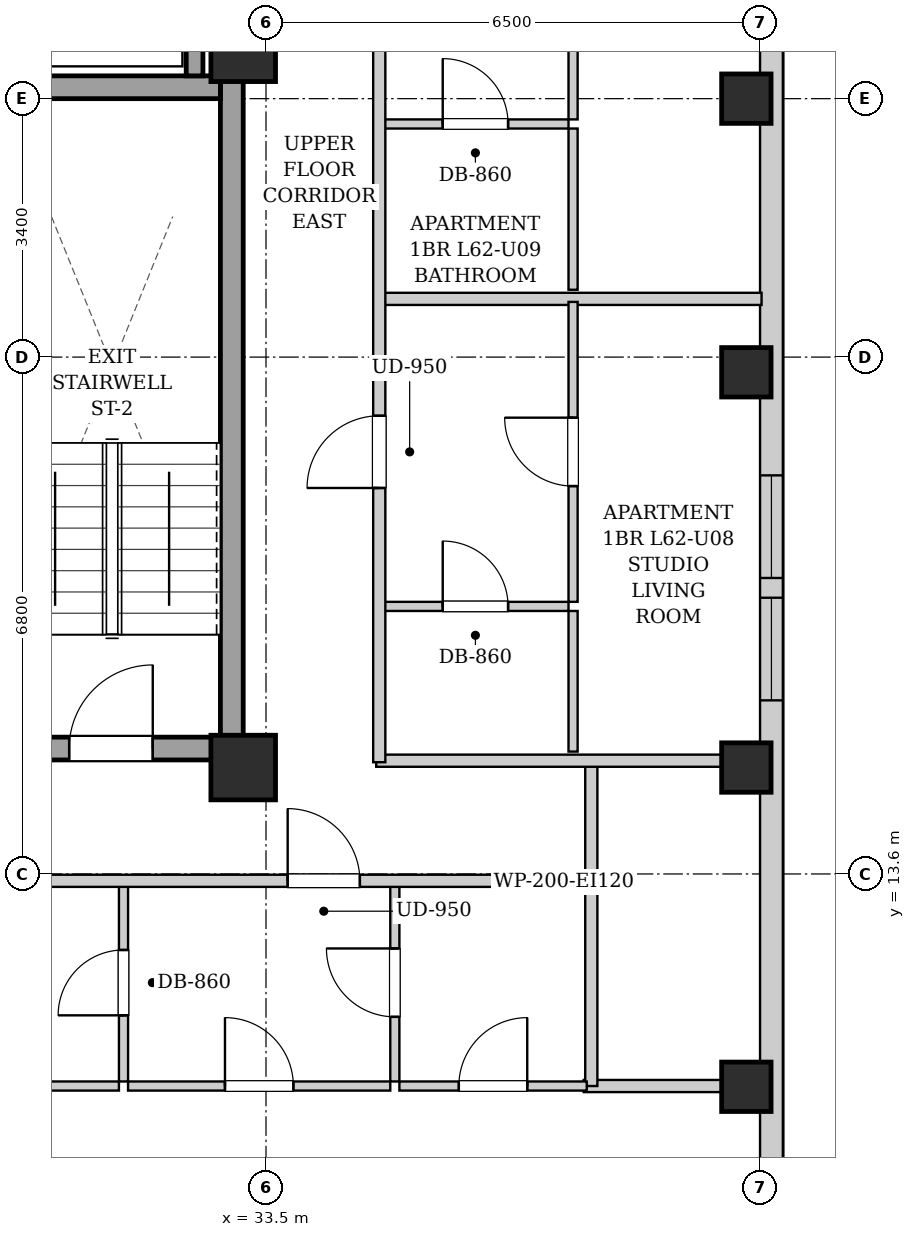
"""IFC4 building model, lengths in metres.
Left out: names, types, materials, properties, quantities, classifications, styles, units other than length and angle.
Written with IfcOpenShell. Run it as: python <this file> out.ifc"""

import sys

from ifc_helpers import new_model, si_unit, direction, frame, frame_2d, origin, origin_2d, place, context, subcontext, project, spatial, rectangle, extrude, element, fill, save


model = new_model("IFC4")
c1 = context("Model", 3, precision=1e-05, world=origin(), true_north=direction((0.0, 1.0)))
c2 = subcontext(c1, "Body", "Model", "MODEL_VIEW")
j1 = project(units=[si_unit("LENGTHUNIT", "METRE"), si_unit("PLANEANGLEUNIT", "RADIAN")], contexts=[c1])
p1 = place(None, origin())
s1 = spatial("IfcSite", under=j1, at=p1, CompositionType="ELEMENT")
p2 = place(p1, origin())
s2 = spatial("IfcBuilding", under=s1, at=p2, CompositionType="ELEMENT")
p3 = place(p2, frame((0.0, 0.0, 214.0)))
s3 = spatial("IfcBuildingStorey", under=s2, at=p3, CompositionType="ELEMENT", Elevation=214.0)
for number, where, z_axis, x_axis in (
    (1, (39.82, 10.8, 0.0), (0.0, 0.0, 1.0), (1.0, 0.0, 0.0)),
    (2, (39.82, 15.0, 0.0), (0.0, 0.0, 1.0), (1.0, 0.0, 0.0)),
    (3, (39.82, 20.2, 0.0), (0.0, 0.0, 1.0), (1.0, 0.0, 0.0)),
    (4, (39.82, 23.8, 0.0), (0.0, 0.0, 1.0), (1.0, 0.0, 0.0)),
):
    element("IfcColumn", number, at=place(p3, frame(where, z_axis=z_axis, x_axis=x_axis)), inside=s3, PredefinedType="COLUMN", context=c2, shape_type="SweptSolid", body=[
        extrude(rectangle(XDim=0.65, YDim=0.65, at=origin_2d()), origin(), (0.0, 0.0, 1.0), 3.3),
    ])
for number, where, z_axis, x_axis in (
    (5, (33.2, 15.0, 0.0), (0.0, 0.0, 1.0), (1.0, 0.0, 0.0)),
    (6, (33.2, 24.45, 0.0), (0.0, 0.0, 1.0), (1.0, 0.0, 0.0)),
):
    element("IfcColumn", number, at=place(p3, frame(where, z_axis=z_axis, x_axis=x_axis)), inside=s3, PredefinedType="COLUMN", context=c2, shape_type="SweptSolid", body=[
        extrude(rectangle(XDim=0.85, YDim=0.85, at=origin_2d()), origin(), (0.0, 0.0, 1.0), 3.3),
    ])
p4 = place(p3, frame((40.15, 37.7, 0.0), z_axis=(0.0, 0.0, 1.0), x_axis=(0.0, -1.0, 0.0)))
e7 = element("IfcWall", 7, at=p4, inside=s3, PredefinedType="SOLIDWALL", context=c2, shape_type="SweptSolid", body=[
    extrude(rectangle(XDim=31.4, YDim=0.3, at=frame_2d((15.7, 0.0))), origin(), (0.0, 0.0, 1.0), 3.04),
])
p5 = place(p4, frame((28.396, 0.0, 0.55)))
e8 = element("IfcOpeningElement", 8, at=p5, cuts=e7, PredefinedType="OPENING", context=c2, shape_type="SweptSolid", body=[
    extrude(rectangle(XDim=1.35, YDim=1.2, at=frame_2d((0.675, 0.6))), frame((0.0, 0.16, 0.0), z_axis=(0.0, -1.0, 0.0), x_axis=(1.0, 0.0, 0.0)), (0.0, 0.0, 1.0), 0.32),
])
p6 = place(p4, frame((1.653, 0.0, 0.55)))
e9 = element("IfcOpeningElement", 9, at=p6, cuts=e7, PredefinedType="OPENING", context=c2, shape_type="SweptSolid", body=[
    extrude(rectangle(XDim=1.35, YDim=1.2, at=frame_2d((0.675, 0.6))), frame((0.0, 0.16, 0.0), z_axis=(0.0, -1.0, 0.0), x_axis=(1.0, 0.0, 0.0)), (0.0, 0.0, 1.0), 0.32),
])
p7 = place(p4, frame((18.856, 0.0, 0.55)))
e10 = element("IfcOpeningElement", 10, at=p7, cuts=e7, PredefinedType="OPENING", context=c2, shape_type="SweptSolid", body=[
    extrude(rectangle(XDim=1.35, YDim=1.2, at=frame_2d((0.675, 0.6))), frame((0.0, 0.16, 0.0), z_axis=(0.0, -1.0, 0.0), x_axis=(1.0, 0.0, 0.0)), (0.0, 0.0, 1.0), 0.32),
])
p8 = place(p4, frame((20.466, 0.0, 0.55)))
e11 = element("IfcOpeningElement", 11, at=p8, cuts=e7, PredefinedType="OPENING", context=c2, shape_type="SweptSolid", body=[
    extrude(rectangle(XDim=1.35, YDim=1.2, at=frame_2d((0.675, 0.6))), frame((0.0, 0.16, 0.0), z_axis=(0.0, -1.0, 0.0), x_axis=(1.0, 0.0, 0.0)), (0.0, 0.0, 1.0), 0.32),
])
p9 = place(p4, frame((11.85, 0.0, 0.55)))
e12 = element("IfcOpeningElement", 12, at=p9, cuts=e7, PredefinedType="OPENING", context=c2, shape_type="SweptSolid", body=[
    extrude(rectangle(XDim=1.35, YDim=1.2, at=frame_2d((0.675, 0.6))), frame((0.0, 0.16, 0.0), z_axis=(0.0, -1.0, 0.0), x_axis=(1.0, 0.0, 0.0)), (0.0, 0.0, 1.0), 0.32),
])
p10 = place(p4, frame((9.185, 0.0, 0.55)))
e13 = element("IfcOpeningElement", 13, at=p10, cuts=e7, PredefinedType="OPENING", context=c2, shape_type="SweptSolid", body=[
    extrude(rectangle(XDim=1.35, YDim=1.2, at=frame_2d((0.675, 0.6))), frame((0.0, 0.16, 0.0), z_axis=(0.0, -1.0, 0.0), x_axis=(1.0, 0.0, 0.0)), (0.0, 0.0, 1.0), 0.32),
])
p11 = place(p3, frame((33.05, 15.1, 0.0), z_axis=(0.0, 0.0, 1.0), x_axis=(0.0, 1.0, 0.0)))
e14 = element("IfcWall", 14, at=p11, inside=s3, PredefinedType="SHEAR", context=c2, shape_type="SweptSolid", body=[
    extrude(rectangle(XDim=9.0, YDim=0.3, at=frame_2d((4.5, 0.0))), origin(), (0.0, 0.0, 1.0), 3.04),
])
p12 = place(p3, frame((30.05, 23.95, 0.0), z_axis=(0.0, 0.0, 1.0), x_axis=(1.0, 0.0, 0.0)))
e15 = element("IfcWall", 15, at=p12, inside=s3, PredefinedType="SHEAR", context=c2, shape_type="SweptSolid", body=[
    extrude(rectangle(XDim=2.85, YDim=0.3, at=frame_2d((1.425, 0.0))), origin(), (0.0, 0.0, 1.0), 3.04),
])
p13 = place(p3, frame((30.05, 15.25, 0.0), z_axis=(0.0, 0.0, 1.0), x_axis=(1.0, 0.0, 0.0)))
e16 = element("IfcWall", 16, at=p13, inside=s3, PredefinedType="SHEAR", context=c2, shape_type="SweptSolid", body=[
    extrude(rectangle(XDim=2.85, YDim=0.3, at=frame_2d((1.425, 0.0))), origin(), (0.0, 0.0, 1.0), 3.04),
])
p14 = place(p13, frame((0.86, 0.0, 0.0)))
e17 = element("IfcOpeningElement", 17, at=p14, cuts=e16, PredefinedType="OPENING", context=c2, shape_type="SweptSolid", body=[
    extrude(rectangle(XDim=1.1, YDim=2.05, at=frame_2d((0.55, 1.025))), frame((0.0, 0.16, 0.0), z_axis=(0.0, -1.0, 0.0), x_axis=(1.0, 0.0, 0.0)), (0.0, 0.0, 1.0), 0.32),
])
p15 = place(p3, frame((32.56, 24.1, 0.0), z_axis=(0.0, 0.0, 1.0), x_axis=(0.0, 1.0, 0.0)))
e18 = element("IfcWall", 18, at=p15, inside=s3, PredefinedType="SHEAR", context=c2, shape_type="SweptSolid", body=[
    extrude(rectangle(XDim=2.07, YDim=0.22, at=frame_2d((1.035, 0.0))), origin(), (0.0, 0.0, 1.0), 3.04),
])
p16 = place(p3, frame((33.12, 24.12, 0.0), z_axis=(0.0, 0.0, 1.0), x_axis=(0.0, 1.0, 0.0)))
e19 = element("IfcWall", 19, at=p16, inside=s3, PredefinedType="PARTITIONING", context=c2, shape_type="SweptSolid", body=[
    extrude(rectangle(XDim=4.76, YDim=0.16, at=frame_2d((2.38, 0.0))), origin(), (0.0, 0.0, 1.0), 3.04),
])
p17 = place(p3, frame((37.78, 13.51, 0.0), z_axis=(0.0, 0.0, 1.0), x_axis=(0.0, 1.0, 0.0)))
e20 = element("IfcWall", 20, at=p17, inside=s3, PredefinedType="PARTITIONING", context=c2, shape_type="SweptSolid", body=[
    extrude(rectangle(XDim=1.58, YDim=0.16, at=frame_2d((0.79, 0.0))), origin(), (0.0, 0.0, 1.0), 3.04),
])
p18 = place(p3, frame((34.95, 15.09, 0.0), z_axis=(0.0, 0.0, 1.0), x_axis=(1.0, 0.0, 0.0)))
e21 = element("IfcWall", 21, at=p18, inside=s3, PredefinedType="PARTITIONING", context=c2, shape_type="SweptSolid", body=[
    extrude(rectangle(XDim=5.07, YDim=0.16, at=frame_2d((2.535, 0.0))), origin(), (0.0, 0.0, 1.0), 2.556),
])
p19 = place(p3, frame((37.68, 10.81, 0.0), z_axis=(0.0, 0.0, 1.0), x_axis=(1.0, 0.0, 0.0)))
e22 = element("IfcWall", 22, at=p19, inside=s3, PredefinedType="PARTITIONING", context=c2, shape_type="SweptSolid", body=[
    extrude(rectangle(XDim=2.34, YDim=0.16, at=frame_2d((1.17, 0.0))), origin(), (0.0, 0.0, 1.0), 3.04),
])
p20 = place(p3, frame((37.78, 10.81, 0.0), z_axis=(0.0, 0.0, 1.0), x_axis=(0.0, 1.0, 0.0)))
e23 = element("IfcWall", 23, at=p20, inside=s3, PredefinedType="PARTITIONING", context=c2, shape_type="SweptSolid", body=[
    extrude(rectangle(XDim=2.66, YDim=0.16, at=frame_2d((1.33, 0.0))), origin(), (0.0, 0.0, 1.0), 3.04),
])
p21 = place(p3, frame((31.625, 10.87, 0.0), z_axis=(0.0, 0.0, 1.0), x_axis=(0.0, 1.0, 0.0)))
e24 = element("IfcWall", 24, at=p21, inside=s3, PredefinedType="PARTITIONING", context=c2, shape_type="SweptSolid", body=[
    extrude(rectangle(XDim=2.6, YDim=0.12, at=frame_2d((1.3, 0.0))), origin(), (0.0, 0.0, 1.0), 3.04),
])
p22 = place(p21, frame((0.87, 0.0, 0.0)))
e25 = element("IfcOpeningElement", 25, at=p22, cuts=e24, PredefinedType="OPENING", context=c2, shape_type="SweptSolid", body=[
    extrude(rectangle(XDim=0.86, YDim=2.05, at=frame_2d((0.43, 1.025))), frame((0.0, 0.07, 0.0), z_axis=(0.0, -1.0, 0.0), x_axis=(1.0, 0.0, 0.0)), (0.0, 0.0, 1.0), 0.14),
])
p23 = place(p3, frame((29.165, 10.81, 0.0), z_axis=(0.0, 0.0, 1.0), x_axis=(1.0, 0.0, 0.0)))
e26 = element("IfcWall", 26, at=p23, inside=s3, PredefinedType="PARTITIONING", context=c2, shape_type="SweptSolid", body=[
    extrude(rectangle(XDim=2.4, YDim=0.12, at=frame_2d((1.2, 0.0))), origin(), (0.0, 0.0, 1.0), 3.04),
])
p24 = place(p3, frame((35.195, 10.87, 0.0), z_axis=(0.0, 0.0, 1.0), x_axis=(0.0, 1.0, 0.0)))
e27 = element("IfcWall", 27, at=p24, inside=s3, PredefinedType="PARTITIONING", context=c2, shape_type="SweptSolid", body=[
    extrude(rectangle(XDim=2.6, YDim=0.12, at=frame_2d((1.3, 0.0))), origin(), (0.0, 0.0, 1.0), 3.04),
])
p25 = place(p24, frame((0.85, 0.0, 0.0)))
e28 = element("IfcOpeningElement", 28, at=p25, cuts=e27, PredefinedType="OPENING", context=c2, shape_type="SweptSolid", body=[
    extrude(rectangle(XDim=0.9, YDim=2.05, at=frame_2d((0.45, 1.025))), frame((0.0, 0.07, 0.0), z_axis=(0.0, -1.0, 0.0), x_axis=(1.0, 0.0, 0.0)), (0.0, 0.0, 1.0), 0.14),
])
p26 = place(p3, frame((31.685, 10.81, 0.0), z_axis=(0.0, 0.0, 1.0), x_axis=(1.0, 0.0, 0.0)))
e29 = element("IfcWall", 29, at=p26, inside=s3, PredefinedType="PARTITIONING", context=c2, shape_type="SweptSolid", body=[
    extrude(rectangle(XDim=3.45, YDim=0.12, at=frame_2d((1.725, 0.0))), origin(), (0.0, 0.0, 1.0), 3.04),
])
p27 = place(p26, frame((1.275, 0.0, 0.0)))
e30 = element("IfcOpeningElement", 30, at=p27, cuts=e29, PredefinedType="OPENING", context=c2, shape_type="SweptSolid", body=[
    extrude(rectangle(XDim=0.9, YDim=2.05, at=frame_2d((0.45, 1.025))), frame((0.0, 0.07, 0.0), z_axis=(0.0, -1.0, 0.0), x_axis=(1.0, 0.0, 0.0)), (0.0, 0.0, 1.0), 0.14),
])
p28 = place(p3, frame((35.255, 10.81, 0.0), z_axis=(0.0, 0.0, 1.0), x_axis=(1.0, 0.0, 0.0)))
e31 = element("IfcWall", 31, at=p28, inside=s3, PredefinedType="PARTITIONING", context=c2, shape_type="SweptSolid", body=[
    extrude(rectangle(XDim=2.465, YDim=0.12, at=frame_2d((1.232, 0.0))), origin(), (0.0, 0.0, 1.0), 3.04),
])
p29 = place(p28, frame((0.782, 0.0, 0.0)))
e32 = element("IfcOpeningElement", 32, at=p29, cuts=e31, PredefinedType="OPENING", context=c2, shape_type="SweptSolid", body=[
    extrude(rectangle(XDim=0.9, YDim=2.05, at=frame_2d((0.45, 1.025))), frame((0.0, 0.07, 0.0), z_axis=(0.0, -1.0, 0.0), x_axis=(1.0, 0.0, 0.0)), (0.0, 0.0, 1.0), 0.14),
])
p30 = place(p3, frame((35.03, 21.166, 0.0), z_axis=(0.0, 0.0, 1.0), x_axis=(1.0, 0.0, 0.0)))
e33 = element("IfcWall", 33, at=p30, inside=s3, PredefinedType="PARTITIONING", context=c2, shape_type="SweptSolid", body=[
    extrude(rectangle(XDim=4.99, YDim=0.16, at=frame_2d((2.495, 0.0))), origin(), (0.0, 0.0, 1.0), 3.04),
])
p31 = place(p3, frame((35.03, 17.12, 0.0), z_axis=(0.0, 0.0, 1.0), x_axis=(1.0, 0.0, 0.0)))
e34 = element("IfcWall", 34, at=p31, inside=s3, PredefinedType="PARTITIONING", context=c2, shape_type="SweptSolid", body=[
    extrude(rectangle(XDim=2.45, YDim=0.12, at=frame_2d((1.225, 0.0))), origin(), (0.0, 0.0, 1.0), 3.04),
])
p32 = place(p31, frame((0.795, 0.0, 0.0)))
e35 = element("IfcOpeningElement", 35, at=p32, cuts=e34, PredefinedType="OPENING", context=c2, shape_type="SweptSolid", body=[
    extrude(rectangle(XDim=0.86, YDim=2.05, at=frame_2d((0.43, 1.025))), frame((0.0, 0.07, 0.0), z_axis=(0.0, -1.0, 0.0), x_axis=(1.0, 0.0, 0.0)), (0.0, 0.0, 1.0), 0.14),
])
p33 = place(p3, frame((37.54, 15.21, 0.0), z_axis=(0.0, 0.0, 1.0), x_axis=(0.0, 1.0, 0.0)))
e36 = element("IfcWall", 36, at=p33, inside=s3, PredefinedType="PARTITIONING", context=c2, shape_type="SweptSolid", body=[
    extrude(rectangle(XDim=1.85, YDim=0.12, at=frame_2d((0.925, 0.0))), origin(), (0.0, 0.0, 1.0), 3.04),
])
p34 = place(p3, frame((37.54, 17.18, 0.0), z_axis=(0.0, 0.0, 1.0), x_axis=(0.0, 1.0, 0.0)))
e37 = element("IfcWall", 37, at=p34, inside=s3, PredefinedType="PARTITIONING", context=c2, shape_type="SweptSolid", body=[
    extrude(rectangle(XDim=3.946, YDim=0.12, at=frame_2d((1.973, 0.0))), origin(), (0.0, 0.0, 1.0), 3.04),
])
p35 = place(p34, frame((1.523, 0.0, 0.0)))
e38 = element("IfcOpeningElement", 38, at=p35, cuts=e37, PredefinedType="OPENING", context=c2, shape_type="SweptSolid", body=[
    extrude(rectangle(XDim=0.9, YDim=2.05, at=frame_2d((0.45, 1.025))), frame((0.0, 0.07, 0.0), z_axis=(0.0, -1.0, 0.0), x_axis=(1.0, 0.0, 0.0)), (0.0, 0.0, 1.0), 0.14),
])
p36 = place(p3, frame((35.03, 23.467, 0.0), z_axis=(0.0, 0.0, 1.0), x_axis=(1.0, 0.0, 0.0)))
e39 = element("IfcWall", 39, at=p36, inside=s3, PredefinedType="PARTITIONING", context=c2, shape_type="SweptSolid", body=[
    extrude(rectangle(XDim=2.45, YDim=0.12, at=frame_2d((1.225, 0.0))), origin(), (0.0, 0.0, 1.0), 3.04),
])
p37 = place(p36, frame((0.795, 0.0, 0.0)))
e40 = element("IfcOpeningElement", 40, at=p37, cuts=e39, PredefinedType="OPENING", context=c2, shape_type="SweptSolid", body=[
    extrude(rectangle(XDim=0.86, YDim=2.05, at=frame_2d((0.43, 1.025))), frame((0.0, 0.07, 0.0), z_axis=(0.0, -1.0, 0.0), x_axis=(1.0, 0.0, 0.0)), (0.0, 0.0, 1.0), 0.14),
])
p38 = place(p3, frame((37.54, 21.286, 0.0), z_axis=(0.0, 0.0, 1.0), x_axis=(0.0, 1.0, 0.0)))
e41 = element("IfcWall", 41, at=p38, inside=s3, PredefinedType="PARTITIONING", context=c2, shape_type="SweptSolid", body=[
    extrude(rectangle(XDim=2.121, YDim=0.12, at=frame_2d((1.061, 0.0))), origin(), (0.0, 0.0, 1.0), 3.04),
])
p39 = place(p3, frame((37.54, 23.527, 0.0), z_axis=(0.0, 0.0, 1.0), x_axis=(0.0, 1.0, 0.0)))
e42 = element("IfcWall", 42, at=p39, inside=s3, PredefinedType="PARTITIONING", context=c2, shape_type="SweptSolid", body=[
    extrude(rectangle(XDim=5.333, YDim=0.12, at=frame_2d((2.667, 0.0))), origin(), (0.0, 0.0, 1.0), 3.04),
])
p40 = place(p39, frame((2.216, 0.0, 0.0)))
e43 = element("IfcOpeningElement", 43, at=p40, cuts=e42, PredefinedType="OPENING", context=c2, shape_type="SweptSolid", body=[
    extrude(rectangle(XDim=0.9, YDim=2.05, at=frame_2d((0.45, 1.025))), frame((0.0, 0.07, 0.0), z_axis=(0.0, -1.0, 0.0), x_axis=(1.0, 0.0, 0.0)), (0.0, 0.0, 1.0), 0.14),
])
p41 = place(p3, frame((13.15, 13.51, 0.0), z_axis=(0.0, 0.0, 1.0), x_axis=(1.0, 0.0, 0.0)))
e44 = element("IfcWall", 44, at=p41, inside=s3, PredefinedType="PARTITIONING", context=c2, shape_type="SweptSolid", body=[
    extrude(rectangle(XDim=24.6, YDim=0.16, at=frame_2d((12.3, 0.0))), origin(), (0.0, 0.0, 1.0), 3.04),
])
p42 = place(p41, frame((5.235, 0.0, 0.0)))
e45 = element("IfcOpeningElement", 45, at=p42, cuts=e44, PredefinedType="OPENING", context=c2, shape_type="SweptSolid", body=[
    extrude(rectangle(XDim=0.95, YDim=2.1, at=frame_2d((0.475, 1.05))), frame((0.0, 0.09, 0.0), z_axis=(0.0, -1.0, 0.0), x_axis=(1.0, 0.0, 0.0)), (0.0, 0.0, 1.0), 0.18),
])
p43 = place(p41, frame((13.503, 0.0, 0.0)))
e46 = element("IfcOpeningElement", 46, at=p43, cuts=e44, PredefinedType="OPENING", context=c2, shape_type="SweptSolid", body=[
    extrude(rectangle(XDim=0.95, YDim=2.1, at=frame_2d((0.475, 1.05))), frame((0.0, 0.09, 0.0), z_axis=(0.0, -1.0, 0.0), x_axis=(1.0, 0.0, 0.0)), (0.0, 0.0, 1.0), 0.18),
])
p44 = place(p41, frame((20.635, 0.0, 0.0)))
e47 = element("IfcOpeningElement", 47, at=p44, cuts=e44, PredefinedType="OPENING", context=c2, shape_type="SweptSolid", body=[
    extrude(rectangle(XDim=0.95, YDim=2.1, at=frame_2d((0.475, 1.05))), frame((0.0, 0.09, 0.0), z_axis=(0.0, -1.0, 0.0), x_axis=(1.0, 0.0, 0.0)), (0.0, 0.0, 1.0), 0.18),
])
p45 = place(p3, frame((34.99, 15.07, 0.0), z_axis=(0.0, 0.0, 1.0), x_axis=(0.0, 1.0, 0.0)))
e48 = element("IfcWall", 48, at=p45, inside=s3, PredefinedType="PARTITIONING", context=c2, shape_type="SweptSolid", body=[
    extrude(rectangle(XDim=13.93, YDim=0.16, at=frame_2d((6.965, 0.0))), origin(), (0.0, 0.0, 1.0), 3.04),
])
p46 = place(p45, frame((3.608, 0.0, 0.0)))
e49 = element("IfcOpeningElement", 49, at=p46, cuts=e48, PredefinedType="OPENING", context=c2, shape_type="SweptSolid", body=[
    extrude(rectangle(XDim=0.95, YDim=2.1, at=frame_2d((0.475, 1.05))), frame((0.0, 0.09, 0.0), z_axis=(0.0, -1.0, 0.0), x_axis=(1.0, 0.0, 0.0)), (0.0, 0.0, 1.0), 0.18),
])
p47 = place(p45, frame((10.649, 0.0, 0.0)))
e50 = element("IfcOpeningElement", 50, at=p47, cuts=e48, PredefinedType="OPENING", context=c2, shape_type="SweptSolid", body=[
    extrude(rectangle(XDim=0.95, YDim=2.1, at=frame_2d((0.475, 1.05))), frame((0.0, 0.09, 0.0), z_axis=(0.0, -1.0, 0.0), x_axis=(1.0, 0.0, 0.0)), (0.0, 0.0, 1.0), 0.18),
])
p48 = place(p14, origin())
e51 = element("IfcDoor", 51, at=p48, inside=s3, OperationType="SINGLE_SWING_RIGHT", PredefinedType="DOOR", context=c2, shape_type="SweptSolid", body=[
    extrude(rectangle(XDim=1.1, YDim=2.05, at=frame_2d((0.55, 1.025))), frame((0.0, 0.025, 0.0), z_axis=(0.0, -1.0, 0.0), x_axis=(1.0, 0.0, 0.0)), (0.0, 0.0, 1.0), 0.05),
])
fill(e17, e51)
p49 = place(p22, origin())
e52 = element("IfcDoor", 52, at=p49, inside=s3, OperationType="SINGLE_SWING_LEFT", PredefinedType="DOOR", context=c2, shape_type="SweptSolid", body=[
    extrude(rectangle(XDim=0.86, YDim=2.05, at=frame_2d((0.43, 1.025))), frame((0.0, 0.025, 0.0), z_axis=(0.0, -1.0, 0.0), x_axis=(1.0, 0.0, 0.0)), (0.0, 0.0, 1.0), 0.05),
])
fill(e25, e52)
p50 = place(p25, origin())
e53 = element("IfcDoor", 53, at=p50, inside=s3, OperationType="SINGLE_SWING_RIGHT", PredefinedType="DOOR", context=c2, shape_type="SweptSolid", body=[
    extrude(rectangle(XDim=0.9, YDim=2.05, at=frame_2d((0.45, 1.025))), frame((0.0, 0.025, 0.0), z_axis=(0.0, -1.0, 0.0), x_axis=(1.0, 0.0, 0.0)), (0.0, 0.0, 1.0), 0.05),
])
fill(e28, e53)
p51 = place(p27, origin())
e54 = element("IfcDoor", 54, at=p51, inside=s3, OperationType="SINGLE_SWING_LEFT", PredefinedType="DOOR", context=c2, shape_type="SweptSolid", body=[
    extrude(rectangle(XDim=0.9, YDim=2.05, at=frame_2d((0.45, 1.025))), frame((0.0, 0.025, 0.0), z_axis=(0.0, -1.0, 0.0), x_axis=(1.0, 0.0, 0.0)), (0.0, 0.0, 1.0), 0.05),
])
fill(e30, e54)
p52 = place(p29, origin())
e55 = element("IfcDoor", 55, at=p52, inside=s3, OperationType="SINGLE_SWING_RIGHT", PredefinedType="DOOR", context=c2, shape_type="SweptSolid", body=[
    extrude(rectangle(XDim=0.9, YDim=2.05, at=frame_2d((0.45, 1.025))), frame((0.0, 0.025, 0.0), z_axis=(0.0, -1.0, 0.0), x_axis=(1.0, 0.0, 0.0)), (0.0, 0.0, 1.0), 0.05),
])
fill(e32, e55)
p53 = place(p32, origin())
e56 = element("IfcDoor", 56, at=p53, inside=s3, OperationType="SINGLE_SWING_LEFT", PredefinedType="DOOR", context=c2, shape_type="SweptSolid", body=[
    extrude(rectangle(XDim=0.86, YDim=2.05, at=frame_2d((0.43, 1.025))), frame((0.0, 0.025, 0.0), z_axis=(0.0, -1.0, 0.0), x_axis=(1.0, 0.0, 0.0)), (0.0, 0.0, 1.0), 0.05),
])
fill(e35, e56)
p54 = place(p35, origin())
e57 = element("IfcDoor", 57, at=p54, inside=s3, OperationType="SINGLE_SWING_RIGHT", PredefinedType="DOOR", context=c2, shape_type="SweptSolid", body=[
    extrude(rectangle(XDim=0.9, YDim=2.05, at=frame_2d((0.45, 1.025))), frame((0.0, 0.025, 0.0), z_axis=(0.0, -1.0, 0.0), x_axis=(1.0, 0.0, 0.0)), (0.0, 0.0, 1.0), 0.05),
])
fill(e38, e57)
p55 = place(p37, origin())
e58 = element("IfcDoor", 58, at=p55, inside=s3, OperationType="SINGLE_SWING_LEFT", PredefinedType="DOOR", context=c2, shape_type="SweptSolid", body=[
    extrude(rectangle(XDim=0.86, YDim=2.05, at=frame_2d((0.43, 1.025))), frame((0.0, 0.025, 0.0), z_axis=(0.0, -1.0, 0.0), x_axis=(1.0, 0.0, 0.0)), (0.0, 0.0, 1.0), 0.05),
])
fill(e40, e58)
p56 = place(p44, origin())
e59 = element("IfcDoor", 59, at=p56, inside=s3, OperationType="SINGLE_SWING_LEFT", PredefinedType="DOOR", context=c2, shape_type="SweptSolid", body=[
    extrude(rectangle(XDim=0.95, YDim=2.1, at=frame_2d((0.475, 1.05))), frame((0.0, 0.025, 0.0), z_axis=(0.0, -1.0, 0.0), x_axis=(1.0, 0.0, 0.0)), (0.0, 0.0, 1.0), 0.05),
])
fill(e47, e59)
p57 = place(p46, origin())
e60 = element("IfcDoor", 60, at=p57, inside=s3, OperationType="SINGLE_SWING_LEFT", PredefinedType="DOOR", context=c2, shape_type="SweptSolid", body=[
    extrude(rectangle(XDim=0.95, YDim=2.1, at=frame_2d((0.475, 1.05))), frame((0.0, 0.025, 0.0), z_axis=(0.0, -1.0, 0.0), x_axis=(1.0, 0.0, 0.0)), (0.0, 0.0, 1.0), 0.05),
])
fill(e49, e60)
p58 = place(p7, origin())
e61 = element("IfcWindow", 61, at=p58, inside=s3, PartitioningType="SINGLE_PANEL", PredefinedType="WINDOW", context=c2, shape_type="SweptSolid", body=[
    extrude(rectangle(XDim=1.35, YDim=1.2, at=frame_2d((0.675, 0.6))), frame((0.0, 0.03, 0.0), z_axis=(0.0, -1.0, 0.0), x_axis=(1.0, 0.0, 0.0)), (0.0, 0.0, 1.0), 0.06),
])
fill(e10, e61)
p59 = place(p8, origin())
e62 = element("IfcWindow", 62, at=p59, inside=s3, PartitioningType="SINGLE_PANEL", PredefinedType="WINDOW", context=c2, shape_type="SweptSolid", body=[
    extrude(rectangle(XDim=1.35, YDim=1.2, at=frame_2d((0.675, 0.6))), frame((0.0, 0.03, 0.0), z_axis=(0.0, -1.0, 0.0), x_axis=(1.0, 0.0, 0.0)), (0.0, 0.0, 1.0), 0.06),
])
fill(e11, e62)
save(model, sys.argv[1])
